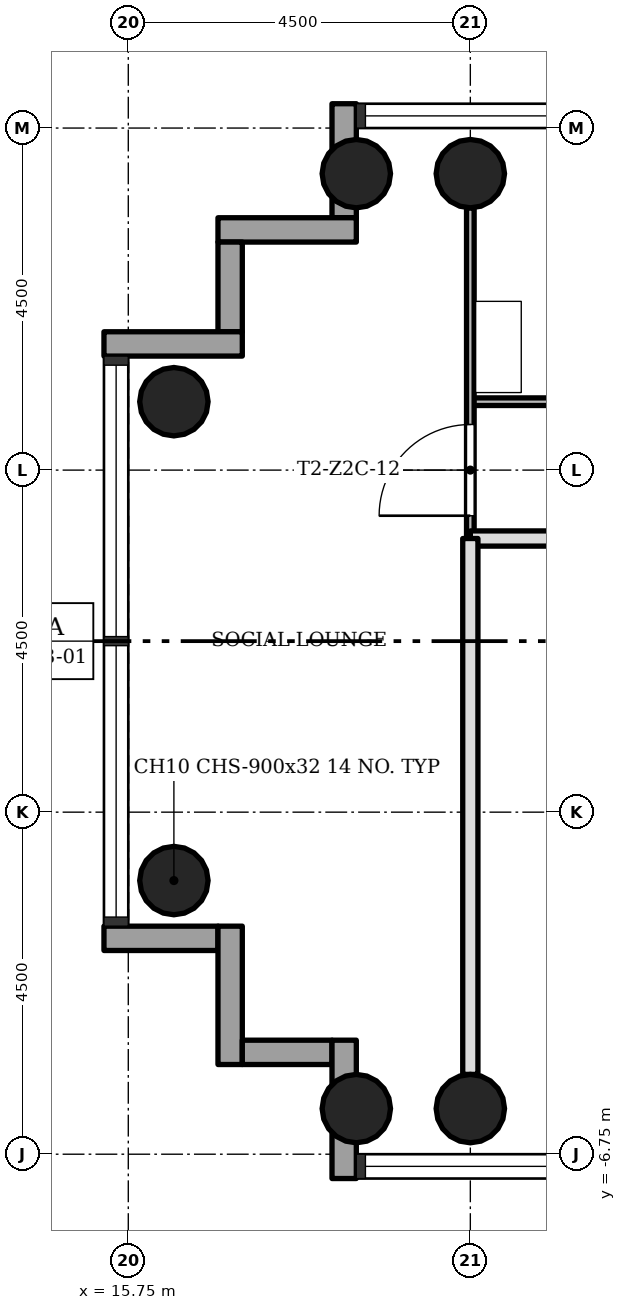
"""IFC4 building model, lengths in metres.
Left out: names, types, materials, properties, quantities, classifications, styles, units other than length and angle.
Written with IfcOpenShell. Run it as: python <this file> out.ifc"""

import sys

from ifc_helpers import new_model, si_unit, direction, frame, frame_2d, origin, origin_2d, place, context, subcontext, project, spatial, rectangle, hollow_circle, extrude, element, fill, save


model = new_model("IFC4")
c1 = context("Model", 3, precision=1e-05, world=origin(), true_north=direction((0.0, 1.0)))
c2 = subcontext(c1, "Body", "Model", "MODEL_VIEW")
j1 = project(units=[si_unit("LENGTHUNIT", "METRE"), si_unit("PLANEANGLEUNIT", "RADIAN")], contexts=[c1])
p1 = place(None, origin())
s1 = spatial("IfcSite", under=j1, at=p1, CompositionType="ELEMENT")
p2 = place(p1, origin())
s2 = spatial("IfcBuilding", under=s1, at=p2, CompositionType="ELEMENT")
p3 = place(p2, frame((0.0, 0.0, 90.2)))
s3 = spatial("IfcBuildingStorey", under=s2, at=p3, CompositionType="ELEMENT", Elevation=90.2)
for number, where, z_axis, x_axis in (
    (1, (20.25, 6.15, 0.0), (0.0, 0.0, 1.0), (1.0, 0.0, 0.0)),
    (2, (20.25, -6.15, 0.0), (0.0, 0.0, 1.0), (1.0, 0.0, 0.0)),
    (3, (18.75, 6.15, 0.0), (0.0, 0.0, 1.0), (1.0, 0.0, 0.0)),
    (4, (18.75, -6.15, 0.0), (0.0, 0.0, 1.0), (1.0, 0.0, 0.0)),
    (5, (16.35, 3.15, 0.0), (0.0, 0.0, 1.0), (1.0, 0.0, 0.0)),
    (6, (16.35, -3.15, 0.0), (0.0, 0.0, 1.0), (1.0, 0.0, 0.0)),
):
    element("IfcColumn", number, at=place(p3, frame(where, z_axis=z_axis, x_axis=x_axis)), inside=s3, PredefinedType="COLUMN", context=c2, shape_type="SweptSolid", body=[
        extrude(hollow_circle(Radius=0.45, WallThickness=0.032, at=origin_2d()), origin(), (0.0, 0.0, 1.0), 3.4),
    ])
p4 = place(p3, frame((18.59, 7.07, -0.3), z_axis=(0.0, 0.0, 1.0), x_axis=(0.0, -1.0, 0.0)))
e7 = element("IfcWall", 7, at=p4, inside=s3, PredefinedType="STANDARD", context=c2, shape_type="SweptSolid", body=[
    extrude(rectangle(XDim=1.5, YDim=0.32, at=frame_2d((0.75, 0.0))), origin(), (0.0, 0.0, 1.0), 3.4),
])
p5 = place(p3, frame((18.75, 5.41, -0.3), z_axis=(0.0, 0.0, 1.0), x_axis=(-1.0, 0.0, 0.0)))
e8 = element("IfcWall", 8, at=p5, inside=s3, PredefinedType="STANDARD", context=c2, shape_type="SweptSolid", body=[
    extrude(rectangle(XDim=1.82, YDim=0.32, at=frame_2d((0.91, 0.0))), origin(), (0.0, 0.0, 1.0), 3.4),
])
p6 = place(p3, frame((17.09, 5.25, -0.3), z_axis=(0.0, 0.0, 1.0), x_axis=(0.0, -1.0, 0.0)))
e9 = element("IfcWall", 9, at=p6, inside=s3, PredefinedType="STANDARD", context=c2, shape_type="SweptSolid", body=[
    extrude(rectangle(XDim=1.18, YDim=0.32, at=frame_2d((0.59, 0.0))), origin(), (0.0, 0.0, 1.0), 3.4),
])
p7 = place(p3, frame((17.25, 3.91, -0.3), z_axis=(0.0, 0.0, 1.0), x_axis=(-1.0, 0.0, 0.0)))
e10 = element("IfcWall", 10, at=p7, inside=s3, PredefinedType="STANDARD", context=c2, shape_type="SweptSolid", body=[
    extrude(rectangle(XDim=1.82, YDim=0.32, at=frame_2d((0.91, 0.0))), origin(), (0.0, 0.0, 1.0), 3.4),
])
p8 = place(p3, frame((15.43, -3.91, -0.3), z_axis=(0.0, 0.0, 1.0), x_axis=(1.0, 0.0, 0.0)))
e11 = element("IfcWall", 11, at=p8, inside=s3, PredefinedType="STANDARD", context=c2, shape_type="SweptSolid", body=[
    extrude(rectangle(XDim=1.5, YDim=0.32, at=frame_2d((0.75, 0.0))), origin(), (0.0, 0.0, 1.0), 3.4),
])
p9 = place(p3, frame((17.09, -3.75, -0.3), z_axis=(0.0, 0.0, 1.0), x_axis=(0.0, -1.0, 0.0)))
e12 = element("IfcWall", 12, at=p9, inside=s3, PredefinedType="STANDARD", context=c2, shape_type="SweptSolid", body=[
    extrude(rectangle(XDim=1.82, YDim=0.32, at=frame_2d((0.91, 0.0))), origin(), (0.0, 0.0, 1.0), 3.4),
])
p10 = place(p3, frame((17.25, -5.41, -0.3), z_axis=(0.0, 0.0, 1.0), x_axis=(1.0, 0.0, 0.0)))
e13 = element("IfcWall", 13, at=p10, inside=s3, PredefinedType="STANDARD", context=c2, shape_type="SweptSolid", body=[
    extrude(rectangle(XDim=1.18, YDim=0.32, at=frame_2d((0.59, 0.0))), origin(), (0.0, 0.0, 1.0), 3.4),
])
p11 = place(p3, frame((18.59, -5.25, -0.3), z_axis=(0.0, 0.0, 1.0), x_axis=(0.0, -1.0, 0.0)))
e14 = element("IfcWall", 14, at=p11, inside=s3, PredefinedType="STANDARD", context=c2, shape_type="SweptSolid", body=[
    extrude(rectangle(XDim=1.82, YDim=0.32, at=frame_2d((0.91, 0.0))), origin(), (0.0, 0.0, 1.0), 3.4),
])
p12 = place(p3, frame((27.45, 1.35, 0.0), z_axis=(0.0, 0.0, 1.0), x_axis=(-1.0, 0.0, 0.0)))
e15 = element("IfcWall", 15, at=p12, inside=s3, PredefinedType="SOLIDWALL", context=c2, shape_type="SweptSolid", body=[
    extrude(rectangle(XDim=7.2, YDim=0.2, at=frame_2d((3.6, 0.0))), origin(), (0.0, 0.0, 1.0), 3.0),
])
p13 = place(p12, frame((4.35, 0.0, 0.0)))
e16 = element("IfcOpeningElement", 16, at=p13, cuts=e15, PredefinedType="OPENING", context=c2, shape_type="SweptSolid", body=[
    extrude(rectangle(XDim=0.9, YDim=2.1, at=frame_2d((0.45, 1.05))), frame((0.0, 0.11, 0.0), z_axis=(0.0, -1.0, 0.0), x_axis=(1.0, 0.0, 0.0)), (0.0, 0.0, 1.0), 0.22),
])
p14 = place(p3, frame((29.25, 3.15, 0.0), z_axis=(0.0, 0.0, 1.0), x_axis=(-1.0, 0.0, 0.0)))
e17 = element("IfcWall", 17, at=p14, inside=s3, PredefinedType="PARTITIONING", context=c2, shape_type="SweptSolid", body=[
    extrude(rectangle(XDim=9.0, YDim=0.1, at=frame_2d((4.5, 0.0))), origin(), (0.0, 0.0, 1.0), 3.0),
])
p15 = place(p14, frame((2.55, 0.0, 0.0)))
e18 = element("IfcOpeningElement", 18, at=p15, cuts=e17, PredefinedType="OPENING", context=c2, shape_type="SweptSolid", body=[
    extrude(rectangle(XDim=0.9, YDim=2.1, at=frame_2d((0.45, 1.05))), frame((0.0, 0.06, 0.0), z_axis=(0.0, -1.0, 0.0), x_axis=(1.0, 0.0, 0.0)), (0.0, 0.0, 1.0), 0.12),
])
p16 = place(p3, frame((20.25, 1.35, 0.0), z_axis=(0.0, 0.0, 1.0), x_axis=(0.0, 1.0, 0.0)))
e19 = element("IfcWall", 19, at=p16, inside=s3, PredefinedType="PARTITIONING", context=c2, shape_type="SweptSolid", body=[
    extrude(rectangle(XDim=4.35, YDim=0.1, at=frame_2d((2.175, 0.0))), origin(), (0.0, 0.0, 1.0), 3.0),
])
p17 = place(p16, frame((0.3, 0.0, 0.0)))
e20 = element("IfcOpeningElement", 20, at=p17, cuts=e19, PredefinedType="OPENING", context=c2, shape_type="SweptSolid", body=[
    extrude(rectangle(XDim=1.2, YDim=2.1, at=frame_2d((0.6, 1.05))), frame((0.0, 0.06, 0.0), z_axis=(0.0, -1.0, 0.0), x_axis=(1.0, 0.0, 0.0)), (0.0, 0.0, 1.0), 0.12),
])
p18 = place(p3, frame((20.25, -5.7, 0.0), z_axis=(0.0, 0.0, 1.0), x_axis=(0.0, 1.0, 0.0)))
e21 = element("IfcWall", 21, at=p18, inside=s3, PredefinedType="SOLIDWALL", context=c2, shape_type="SweptSolid", body=[
    extrude(rectangle(XDim=7.05, YDim=0.2, at=frame_2d((3.525, 0.0))), origin(), (0.0, 0.0, 1.0), 3.0),
])
p19 = place(p17, origin())
e22 = element("IfcDoor", 22, at=p19, inside=s3, OperationType="SINGLE_SWING_RIGHT", PredefinedType="DOOR", context=c2, shape_type="SweptSolid", body=[
    extrude(rectangle(XDim=1.2, YDim=2.1, at=frame_2d((0.6, 1.05))), frame((0.0, 0.025, 0.0), z_axis=(0.0, -1.0, 0.0), x_axis=(1.0, 0.0, 0.0)), (0.0, 0.0, 1.0), 0.05),
])
fill(e20, e22)
save(model, sys.argv[1])
